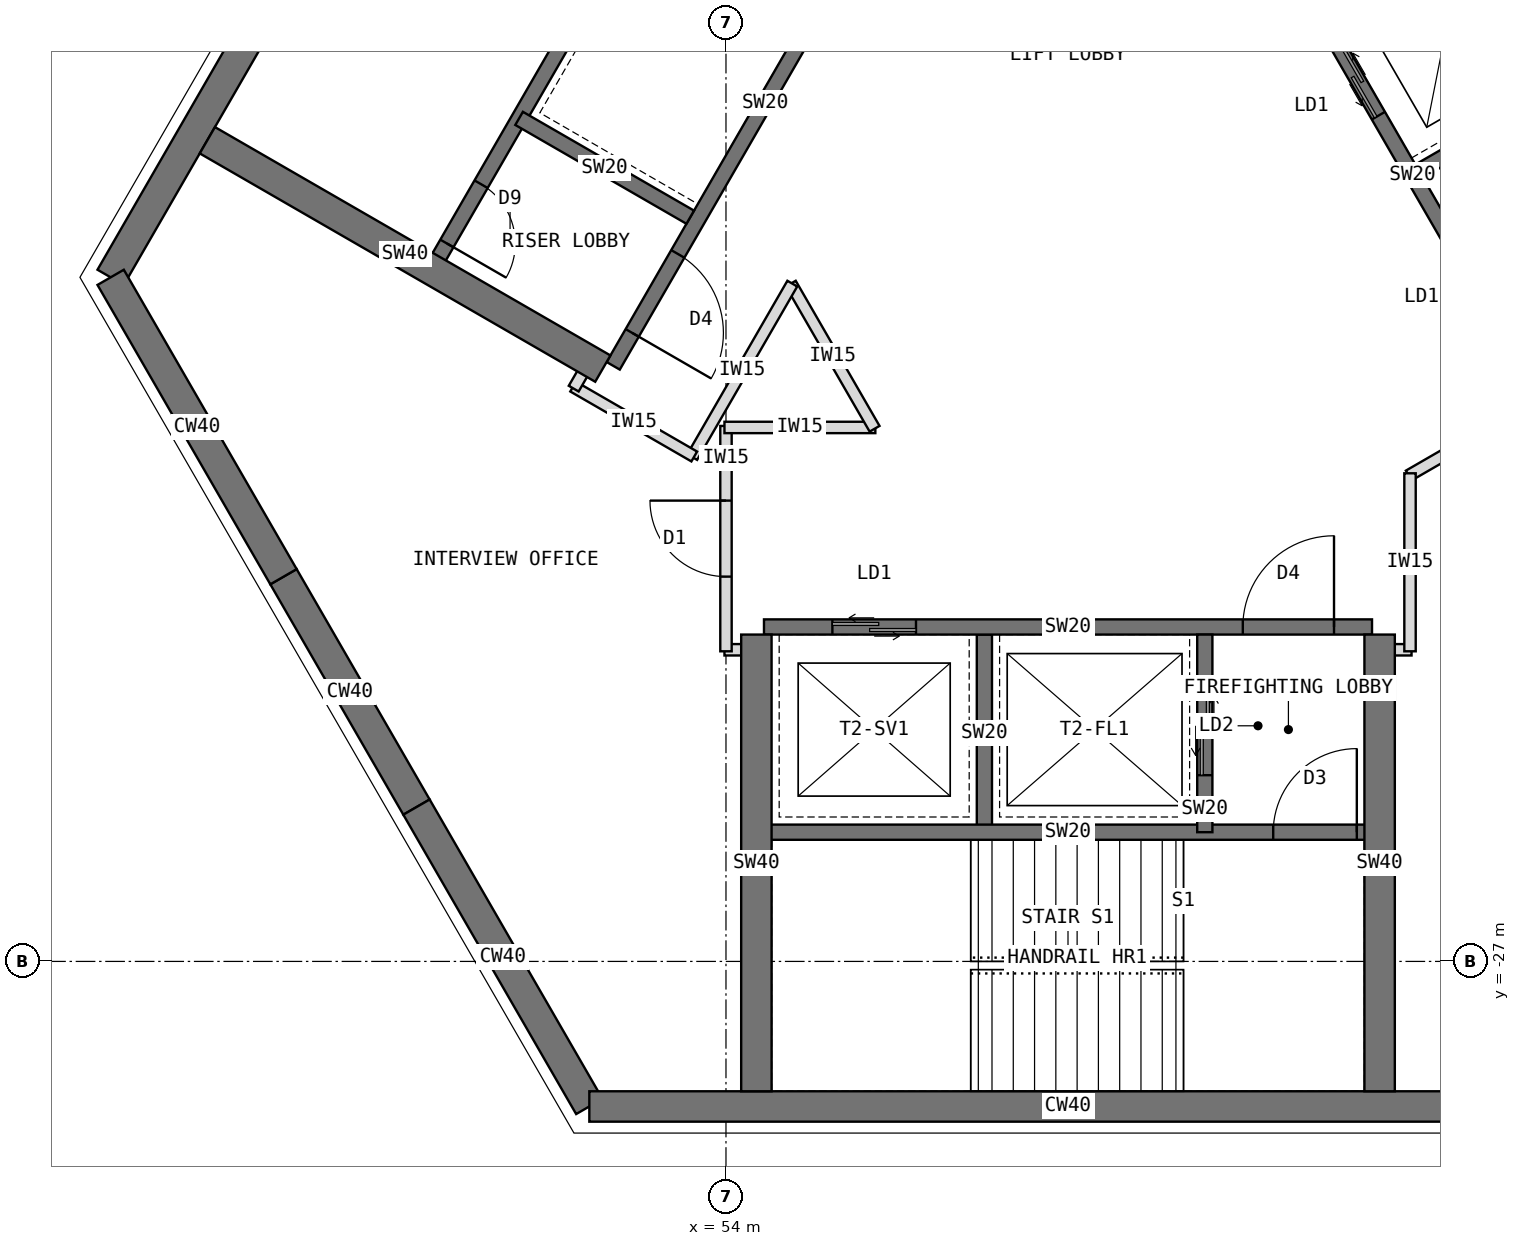
"""IFC4 building model, lengths in metres.
Left out: names, types, materials, properties, quantities, classifications, styles, units other than length and angle.
Written with IfcOpenShell. Run it as: python <this file> out.ifc"""

import sys

from ifc_helpers import new_model, si_unit, direction, frame, frame_2d, origin, place, context, subcontext, project, spatial, rectangle, extrude, element, fill, save


model = new_model("IFC4")
c1 = context("Model", 3, precision=1e-05, world=origin(), true_north=direction((0.0, 1.0)))
c2 = subcontext(c1, "Body", "Model", "MODEL_VIEW")
j1 = project(units=[si_unit("LENGTHUNIT", "METRE"), si_unit("PLANEANGLEUNIT", "RADIAN")], contexts=[c1])
p1 = place(None, origin())
s1 = spatial("IfcSite", under=j1, at=p1, CompositionType="ELEMENT")
p2 = place(p1, origin())
s2 = spatial("IfcBuilding", under=s1, at=p2, CompositionType="ELEMENT")
p3 = place(p2, frame((0.0, 0.0, 247.5)))
s3 = spatial("IfcBuildingStorey", under=s2, at=p3, CompositionType="ELEMENT", Elevation=247.5)
p4 = place(p3, frame((52.202, -7.092, 0.0), z_axis=(0.0, 0.0, 1.0), x_axis=(-0.500005998175, -0.866021940709, 0.0)))
e1 = element("IfcWall", 1, at=p4, inside=s3, PredefinedType="SHEAR", context=c2, shape_type="SweptSolid", body=[
    extrude(rectangle(XDim=12.596, YDim=0.4, at=frame_2d((6.298, 0.0))), origin(), (0.0, 0.0, 1.0), 4.0),
])
p5 = place(p3, frame((45.904, -18.0, 0.0), z_axis=(0.0, 0.0, 1.0), x_axis=(0.500024481964, -0.866011268655, 0.0)))
e2 = element("IfcWall", 2, at=p5, inside=s3, PredefinedType="SHEAR", context=c2, shape_type="SweptSolid", body=[
    extrude(rectangle(XDim=4.548, YDim=0.4, at=frame_2d((2.274, 0.0))), origin(), (0.0, 0.0, 1.0), 4.0),
])
p6 = place(p3, frame((48.178, -21.939, 0.0), z_axis=(0.0, 0.0, 1.0), x_axis=(0.500010275428, -0.866019471182, 0.0)))
e3 = element("IfcWall", 3, at=p6, inside=s3, PredefinedType="SHEAR", context=c2, shape_type="SweptSolid", body=[
    extrude(rectangle(XDim=3.5, YDim=0.4, at=frame_2d((1.75, 0.0))), origin(), (0.0, 0.0, 1.0), 4.0),
])
p7 = place(p3, frame((49.928, -24.97, 0.0), z_axis=(0.0, 0.0, 1.0), x_axis=(0.499984222037, -0.866034513004, 0.0)))
e4 = element("IfcWall", 4, at=p7, inside=s3, PredefinedType="SHEAR", context=c2, shape_type="SweptSolid", body=[
    extrude(rectangle(XDim=4.548, YDim=0.4, at=frame_2d((2.274, 0.0))), origin(), (0.0, 0.0, 1.0), 4.0),
])
p8 = place(p3, frame((52.202, -28.908, 0.0), z_axis=(0.0, 0.0, 1.0), x_axis=(1.0, 0.0, 0.0)))
e5 = element("IfcWall", 5, at=p8, inside=s3, PredefinedType="SHEAR", context=c2, shape_type="SweptSolid", body=[
    extrude(rectangle(XDim=12.596, YDim=0.4, at=frame_2d((6.298, 0.0))), origin(), (0.0, 0.0, 1.0), 4.0),
])
p9 = place(p3, frame((56.516, -12.236, 0.0), z_axis=(0.0, 0.0, 1.0), x_axis=(-0.49999894854, -0.866026010844, 0.0)))
e6 = element("IfcWall", 6, at=p9, inside=s3, PredefinedType="SHEAR", context=c2, shape_type="SweptSolid", body=[
    extrude(rectangle(XDim=8.0, YDim=0.2, at=frame_2d((4.0, 0.0))), origin(), (0.0, 0.0, 1.0), 4.0),
])
p10 = place(p9, frame((6.3, 0.0, 0.0)))
e7 = element("IfcOpeningElement", 7, at=p10, cuts=e6, PredefinedType="OPENING", context=c2, shape_type="SweptSolid", body=[
    extrude(rectangle(XDim=1.2, YDim=2.1, at=frame_2d((0.6, 1.05))), frame((0.0, 0.11, 0.0), z_axis=(0.0, -1.0, 0.0), x_axis=(1.0, 0.0, 0.0)), (0.0, 0.0, 1.0), 0.22),
])
p11 = place(p3, frame((53.53, -17.209, 0.0), z_axis=(0.0, 0.0, 1.0), x_axis=(-0.866062058628, 0.499936506574, 0.0)))
e8 = element("IfcWall", 8, at=p11, inside=s3, PredefinedType="SHEAR", context=c2, shape_type="SweptSolid", body=[
    extrude(rectangle(XDim=2.6, YDim=0.2, at=frame_2d((1.3, 0.0))), origin(), (0.0, 0.0, 1.0), 4.0),
])
p12 = place(p3, frame((54.178, -10.886, 0.0), z_axis=(0.0, 0.0, 1.0), x_axis=(-0.49999894854, -0.866026010844, 0.0)))
e9 = element("IfcWall", 9, at=p12, inside=s3, PredefinedType="SHEAR", context=c2, shape_type="SweptSolid", body=[
    extrude(rectangle(XDim=8.0, YDim=0.2, at=frame_2d((4.0, 0.0))), origin(), (0.0, 0.0, 1.0), 4.0),
])
p13 = place(p12, frame((6.8, 0.0, 0.0)))
e10 = element("IfcOpeningElement", 10, at=p13, cuts=e9, PredefinedType="OPENING", context=c2, shape_type="SweptSolid", body=[
    extrude(rectangle(XDim=0.9, YDim=2.1, at=frame_2d((0.45, 1.05))), frame((0.0, 0.11, 0.0), z_axis=(0.0, -1.0, 0.0), x_axis=(1.0, 0.0, 0.0)), (0.0, 0.0, 1.0), 0.22),
])
p14 = place(p3, frame((52.38, -19.201, 0.0), z_axis=(0.0, 0.0, 1.0), x_axis=(-0.866026570101, 0.499997979876, 0.0)))
e11 = element("IfcWall", 11, at=p14, inside=s3, PredefinedType="SHEAR", context=c2, shape_type="SweptSolid", body=[
    extrude(rectangle(XDim=6.008, YDim=0.4, at=frame_2d((3.004, 0.0))), origin(), (0.0, 0.0, 1.0), 4.0),
])
p15 = place(p3, frame((54.5, -22.6, 0.0), z_axis=(0.0, 0.0, 1.0), x_axis=(1.0, 0.0, 0.0)))
e12 = element("IfcWall", 12, at=p15, inside=s3, PredefinedType="SHEAR", context=c2, shape_type="SweptSolid", body=[
    extrude(rectangle(XDim=8.0, YDim=0.2, at=frame_2d((4.0, 0.0))), origin(), (0.0, 0.0, 1.0), 4.0),
])
p16 = place(p15, frame((6.3, 0.0, 0.0)))
e13 = element("IfcOpeningElement", 13, at=p16, cuts=e12, PredefinedType="OPENING", context=c2, shape_type="SweptSolid", body=[
    extrude(rectangle(XDim=1.2, YDim=2.1, at=frame_2d((0.6, 1.05))), frame((0.0, 0.11, 0.0), z_axis=(0.0, -1.0, 0.0), x_axis=(1.0, 0.0, 0.0)), (0.0, 0.0, 1.0), 0.22),
])
p17 = place(p15, frame((0.9, 0.0, 0.0)))
e14 = element("IfcOpeningElement", 14, at=p17, cuts=e12, PredefinedType="OPENING", context=c2, shape_type="SweptSolid", body=[
    extrude(rectangle(XDim=1.1, YDim=2.2, at=frame_2d((0.55, 1.1))), frame((0.0, 0.11, 0.0), z_axis=(0.0, -1.0, 0.0), x_axis=(1.0, 0.0, 0.0)), (0.0, 0.0, 1.0), 0.22),
])
p18 = place(p3, frame((57.4, -22.7, 0.0), z_axis=(0.0, 0.0, 1.0), x_axis=(0.0, -1.0, 0.0)))
e15 = element("IfcWall", 15, at=p18, inside=s3, PredefinedType="SHEAR", context=c2, shape_type="SweptSolid", body=[
    extrude(rectangle(XDim=2.6, YDim=0.2, at=frame_2d((1.3, 0.0))), origin(), (0.0, 0.0, 1.0), 4.0),
])
p19 = place(p3, frame((60.3, -22.7, 0.0), z_axis=(0.0, 0.0, 1.0), x_axis=(0.0, -1.0, 0.0)))
e16 = element("IfcWall", 16, at=p19, inside=s3, PredefinedType="SHEAR", context=c2, shape_type="SweptSolid", body=[
    extrude(rectangle(XDim=2.6, YDim=0.2, at=frame_2d((1.3, 0.0))), origin(), (0.0, 0.0, 1.0), 4.0),
])
p20 = place(p19, frame((0.55, 0.0, 0.0)))
e17 = element("IfcOpeningElement", 17, at=p20, cuts=e16, PredefinedType="OPENING", context=c2, shape_type="SweptSolid", body=[
    extrude(rectangle(XDim=1.3, YDim=2.2, at=frame_2d((0.65, 1.1))), frame((0.0, 0.11, 0.0), z_axis=(0.0, -1.0, 0.0), x_axis=(1.0, 0.0, 0.0)), (0.0, 0.0, 1.0), 0.22),
])
p21 = place(p3, frame((54.5, -25.3, 0.0), z_axis=(0.0, 0.0, 1.0), x_axis=(1.0, 0.0, 0.0)))
e18 = element("IfcWall", 18, at=p21, inside=s3, PredefinedType="SHEAR", context=c2, shape_type="SweptSolid", body=[
    extrude(rectangle(XDim=8.0, YDim=0.2, at=frame_2d((4.0, 0.0))), origin(), (0.0, 0.0, 1.0), 4.0),
])
p22 = place(p21, frame((6.7, 0.0, 0.0)))
e19 = element("IfcOpeningElement", 19, at=p22, cuts=e18, PredefinedType="OPENING", context=c2, shape_type="SweptSolid", body=[
    extrude(rectangle(XDim=1.1, YDim=2.1, at=frame_2d((0.55, 1.05))), frame((0.0, 0.11, 0.0), z_axis=(0.0, -1.0, 0.0), x_axis=(1.0, 0.0, 0.0)), (0.0, 0.0, 1.0), 0.22),
])
for number, where, z_axis, x_axis in (
    (20, (62.6, -22.7, 0.0), (0.0, 0.0, 1.0), (0.0, -1.0, 0.0)),
    (21, (54.4, -22.7, 0.0), (0.0, 0.0, 1.0), (0.0, -1.0, 0.0)),
):
    element("IfcWall", number, at=place(p3, frame(where, z_axis=z_axis, x_axis=x_axis)), inside=s3, PredefinedType="SHEAR", context=c2, shape_type="SweptSolid", body=[
        extrude(rectangle(XDim=6.008, YDim=0.4, at=frame_2d((3.004, 0.0))), origin(), (0.0, 0.0, 1.0), 4.0),
    ])
p23 = place(p3, frame((64.484, -19.164, 0.0), z_axis=(0.0, 0.0, 1.0), x_axis=(-0.49999894854, 0.866026010844, 0.0)))
e22 = element("IfcWall", 22, at=p23, inside=s3, PredefinedType="SHEAR", context=c2, shape_type="SweptSolid", body=[
    extrude(rectangle(XDim=8.0, YDim=0.2, at=frame_2d((4.0, 0.0))), origin(), (0.0, 0.0, 1.0), 4.0),
])
p24 = place(p23, frame((6.3, 0.0, 0.0)))
e23 = element("IfcOpeningElement", 23, at=p24, cuts=e22, PredefinedType="OPENING", context=c2, shape_type="SweptSolid", body=[
    extrude(rectangle(XDim=1.2, YDim=2.1, at=frame_2d((0.6, 1.05))), frame((0.0, 0.11, 0.0), z_axis=(0.0, -1.0, 0.0), x_axis=(1.0, 0.0, 0.0)), (0.0, 0.0, 1.0), 0.22),
])
p25 = place(p23, frame((0.9, 0.0, 0.0)))
e24 = element("IfcOpeningElement", 24, at=p25, cuts=e22, PredefinedType="OPENING", context=c2, shape_type="SweptSolid", body=[
    extrude(rectangle(XDim=1.1, YDim=2.2, at=frame_2d((0.55, 1.1))), frame((0.0, 0.11, 0.0), z_axis=(0.0, -1.0, 0.0), x_axis=(1.0, 0.0, 0.0)), (0.0, 0.0, 1.0), 0.22),
])
p26 = place(p23, frame((3.8, 0.0, 0.0)))
e25 = element("IfcOpeningElement", 25, at=p26, cuts=e22, PredefinedType="OPENING", context=c2, shape_type="SweptSolid", body=[
    extrude(rectangle(XDim=1.1, YDim=2.2, at=frame_2d((0.55, 1.1))), frame((0.0, 0.11, 0.0), z_axis=(0.0, -1.0, 0.0), x_axis=(1.0, 0.0, 0.0)), (0.0, 0.0, 1.0), 0.22),
])
p27 = place(p3, frame((63.12, -16.603, 0.0), z_axis=(0.0, 0.0, 1.0), x_axis=(0.866062058628, 0.499936506574, 0.0)))
e26 = element("IfcWall", 26, at=p27, inside=s3, PredefinedType="SHEAR", context=c2, shape_type="SweptSolid", body=[
    extrude(rectangle(XDim=2.6, YDim=0.2, at=frame_2d((1.3, 0.0))), origin(), (0.0, 0.0, 1.0), 4.0),
])
p28 = place(p3, frame((66.822, -17.814, 0.0), z_axis=(0.0, 0.0, 1.0), x_axis=(-0.49999894854, 0.866026010844, 0.0)))
e27 = element("IfcWall", 27, at=p28, inside=s3, PredefinedType="SHEAR", context=c2, shape_type="SweptSolid", body=[
    extrude(rectangle(XDim=8.0, YDim=0.2, at=frame_2d((4.0, 0.0))), origin(), (0.0, 0.0, 1.0), 4.0),
])
p29 = place(p28, frame((6.7, 0.0, 0.0)))
e28 = element("IfcOpeningElement", 28, at=p29, cuts=e27, PredefinedType="OPENING", context=c2, shape_type="SweptSolid", body=[
    extrude(rectangle(XDim=1.1, YDim=2.1, at=frame_2d((0.55, 1.05))), frame((0.0, 0.11, 0.0), z_axis=(0.0, -1.0, 0.0), x_axis=(1.0, 0.0, 0.0)), (0.0, 0.0, 1.0), 0.22),
])
for number, where, z_axis, x_axis in (
    (29, (63.02, -22.9, 0.0), (0.0, 0.0, 1.0), (-1.0, 0.0, 0.0)),
    (30, (54.41, -22.9, 0.0), (0.0, 0.0, 1.0), (-1.0, 0.0, 0.0)),
):
    element("IfcWall", number, at=place(p3, frame(where, z_axis=z_axis, x_axis=x_axis)), inside=s3, PredefinedType="PARTITIONING", context=c2, shape_type="SweptSolid", body=[
        extrude(rectangle(XDim=0.43, YDim=0.15, at=frame_2d((0.215, 0.0))), origin(), (0.0, 0.0, 1.0), 3.8),
    ])
p30 = place(p3, frame((54.0, -22.92, 0.0), z_axis=(0.0, 0.0, 1.0), x_axis=(0.0, 1.0, 0.0)))
e31 = element("IfcWall", 31, at=p30, inside=s3, PredefinedType="PARTITIONING", context=c2, shape_type="SweptSolid", body=[
    extrude(rectangle(XDim=2.965, YDim=0.15, at=frame_2d((1.482, 0.0))), origin(), (0.0, 0.0, 1.0), 3.8),
])
p31 = place(p30, frame((0.982, 0.0, 0.0)))
e32 = element("IfcOpeningElement", 32, at=p31, cuts=e31, PredefinedType="OPENING", context=c2, shape_type="SweptSolid", body=[
    extrude(rectangle(XDim=1.0, YDim=2.1, at=frame_2d((0.5, 1.05))), frame((0.0, 0.085, 0.0), z_axis=(0.0, -1.0, 0.0), x_axis=(1.0, 0.0, 0.0)), (0.0, 0.0, 1.0), 0.17),
])
p32 = place(p3, frame((53.98, -19.975, 0.0), z_axis=(0.0, 0.0, 1.0), x_axis=(1.0, 0.0, 0.0)))
e33 = element("IfcWall", 33, at=p32, inside=s3, PredefinedType="PARTITIONING", context=c2, shape_type="SweptSolid", body=[
    extrude(rectangle(XDim=1.985, YDim=0.15, at=frame_2d((0.993, 0.0))), origin(), (0.0, 0.0, 1.0), 3.8),
])
p33 = place(p3, frame((55.955, -19.992, 0.0), z_axis=(0.0, 0.0, 1.0), x_axis=(-0.499914148034, 0.866074964767, 0.0)))
e34 = element("IfcWall", 34, at=p33, inside=s3, PredefinedType="PARTITIONING", context=c2, shape_type="SweptSolid", body=[
    extrude(rectangle(XDim=2.205, YDim=0.15, at=frame_2d((1.103, 0.0))), origin(), (0.0, 0.0, 1.0), 3.8),
])
p34 = place(p3, frame((54.873, -18.083, 0.0), z_axis=(0.0, 0.0, 1.0), x_axis=(-0.500005864412, -0.866022017938, 0.0)))
e35 = element("IfcWall", 35, at=p34, inside=s3, PredefinedType="PARTITIONING", context=c2, shape_type="SweptSolid", body=[
    extrude(rectangle(XDim=2.635, YDim=0.15, at=frame_2d((1.317, 0.0))), origin(), (0.0, 0.0, 1.0), 3.8),
])
p35 = place(p3, frame((53.583, -20.357, 0.0), z_axis=(0.0, 0.0, 1.0), x_axis=(-0.865955748254, 0.500120627516, 0.0)))
e36 = element("IfcWall", 36, at=p35, inside=s3, PredefinedType="PARTITIONING", context=c2, shape_type="SweptSolid", body=[
    extrude(rectangle(XDim=1.84, YDim=0.15, at=frame_2d((0.92, 0.0))), origin(), (0.0, 0.0, 1.0), 3.8),
])
p36 = place(p3, frame((51.997, -19.464, 0.0), z_axis=(0.0, 0.0, 1.0), x_axis=(0.499804398801, 0.866138304741, 0.0)))
e37 = element("IfcWall", 37, at=p36, inside=s3, PredefinedType="PARTITIONING", context=c2, shape_type="SweptSolid", body=[
    extrude(rectangle(XDim=0.43, YDim=0.15, at=frame_2d((0.215, 0.0))), origin(), (0.0, 0.0, 1.0), 3.8),
])
p37 = place(p3, frame((65.011, -19.437, 0.0), z_axis=(0.0, 0.0, 1.0), x_axis=(-0.865982457891, -0.500074377092, 0.0)))
e38 = element("IfcWall", 38, at=p37, inside=s3, PredefinedType="PARTITIONING", context=c2, shape_type="SweptSolid", body=[
    extrude(rectangle(XDim=2.342, YDim=0.15, at=frame_2d((1.171, 0.0))), origin(), (0.0, 0.0, 1.0), 3.8),
])
p38 = place(p37, frame((0.671, 0.0, 0.0)))
e39 = element("IfcOpeningElement", 39, at=p38, cuts=e38, PredefinedType="OPENING", context=c2, shape_type="SweptSolid", body=[
    extrude(rectangle(XDim=1.0, YDim=2.1, at=frame_2d((0.5, 1.05))), frame((0.0, 0.085, 0.0), z_axis=(0.0, -1.0, 0.0), x_axis=(1.0, 0.0, 0.0)), (0.0, 0.0, 1.0), 0.17),
])
p39 = place(p3, frame((63.0, -20.578, 0.0), z_axis=(0.0, 0.0, 1.0), x_axis=(0.0, -1.0, 0.0)))
e40 = element("IfcWall", 40, at=p39, inside=s3, PredefinedType="PARTITIONING", context=c2, shape_type="SweptSolid", body=[
    extrude(rectangle(XDim=2.342, YDim=0.15, at=frame_2d((1.171, 0.0))), origin(), (0.0, 0.0, 1.0), 3.8),
])
p40 = place(p10, origin())
e41 = element("IfcDoor", 41, at=p40, inside=s3, OperationType="SINGLE_SWING_RIGHT", PredefinedType="DOOR", context=c2, shape_type="SweptSolid", body=[
    extrude(rectangle(XDim=1.2, YDim=2.1, at=frame_2d((0.6, 1.05))), frame((0.0, 0.025, 0.0), z_axis=(0.0, -1.0, 0.0), x_axis=(1.0, 0.0, 0.0)), (0.0, 0.0, 1.0), 0.05),
])
fill(e7, e41)
p41 = place(p13, origin())
e42 = element("IfcDoor", 42, at=p41, inside=s3, OperationType="SINGLE_SWING_RIGHT", PredefinedType="DOOR", context=c2, shape_type="SweptSolid", body=[
    extrude(rectangle(XDim=0.9, YDim=2.1, at=frame_2d((0.45, 1.05))), frame((0.0, 0.025, 0.0), z_axis=(0.0, -1.0, 0.0), x_axis=(1.0, 0.0, 0.0)), (0.0, 0.0, 1.0), 0.05),
])
fill(e10, e42)
p42 = place(p16, origin())
e43 = element("IfcDoor", 43, at=p42, inside=s3, OperationType="SINGLE_SWING_RIGHT", PredefinedType="DOOR", context=c2, shape_type="SweptSolid", body=[
    extrude(rectangle(XDim=1.2, YDim=2.1, at=frame_2d((0.6, 1.05))), frame((0.0, 0.025, 0.0), z_axis=(0.0, -1.0, 0.0), x_axis=(1.0, 0.0, 0.0)), (0.0, 0.0, 1.0), 0.05),
])
fill(e13, e43)
p43 = place(p20, origin())
e44 = element("IfcDoor", 44, at=p43, inside=s3, OperationType="DOUBLE_DOOR_SLIDING", PredefinedType="DOOR", context=c2, shape_type="SweptSolid", body=[
    extrude(rectangle(XDim=1.3, YDim=2.2, at=frame_2d((0.65, 1.1))), frame((0.0, 0.025, 0.0), z_axis=(0.0, -1.0, 0.0), x_axis=(1.0, 0.0, 0.0)), (0.0, 0.0, 1.0), 0.05),
])
fill(e17, e44)
p44 = place(p17, origin())
e45 = element("IfcDoor", 45, at=p44, inside=s3, OperationType="DOUBLE_DOOR_SLIDING", PredefinedType="DOOR", context=c2, shape_type="SweptSolid", body=[
    extrude(rectangle(XDim=1.1, YDim=2.2, at=frame_2d((0.55, 1.1))), frame((0.0, 0.025, 0.0), z_axis=(0.0, -1.0, 0.0), x_axis=(1.0, 0.0, 0.0)), (0.0, 0.0, 1.0), 0.05),
])
fill(e14, e45)
p45 = place(p22, origin())
e46 = element("IfcDoor", 46, at=p45, inside=s3, OperationType="SINGLE_SWING_RIGHT", PredefinedType="DOOR", context=c2, shape_type="SweptSolid", body=[
    extrude(rectangle(XDim=1.1, YDim=2.1, at=frame_2d((0.55, 1.05))), frame((0.0, 0.025, 0.0), z_axis=(0.0, -1.0, 0.0), x_axis=(1.0, 0.0, 0.0)), (0.0, 0.0, 1.0), 0.05),
])
fill(e19, e46)
p46 = place(p26, origin())
e47 = element("IfcDoor", 47, at=p46, inside=s3, OperationType="DOUBLE_DOOR_SLIDING", PredefinedType="DOOR", context=c2, shape_type="SweptSolid", body=[
    extrude(rectangle(XDim=1.1, YDim=2.2, at=frame_2d((0.55, 1.1))), frame((0.0, 0.025, 0.0), z_axis=(0.0, -1.0, 0.0), x_axis=(1.0, 0.0, 0.0)), (0.0, 0.0, 1.0), 0.05),
])
fill(e25, e47)
p47 = place(p31, origin())
e48 = element("IfcDoor", 48, at=p47, inside=s3, OperationType="SINGLE_SWING_RIGHT", PredefinedType="DOOR", context=c2, shape_type="SweptSolid", body=[
    extrude(rectangle(XDim=1.0, YDim=2.1, at=frame_2d((0.5, 1.05))), frame((0.0, 0.025, 0.0), z_axis=(0.0, -1.0, 0.0), x_axis=(1.0, 0.0, 0.0)), (0.0, 0.0, 1.0), 0.05),
])
fill(e32, e48)
save(model, sys.argv[1])
